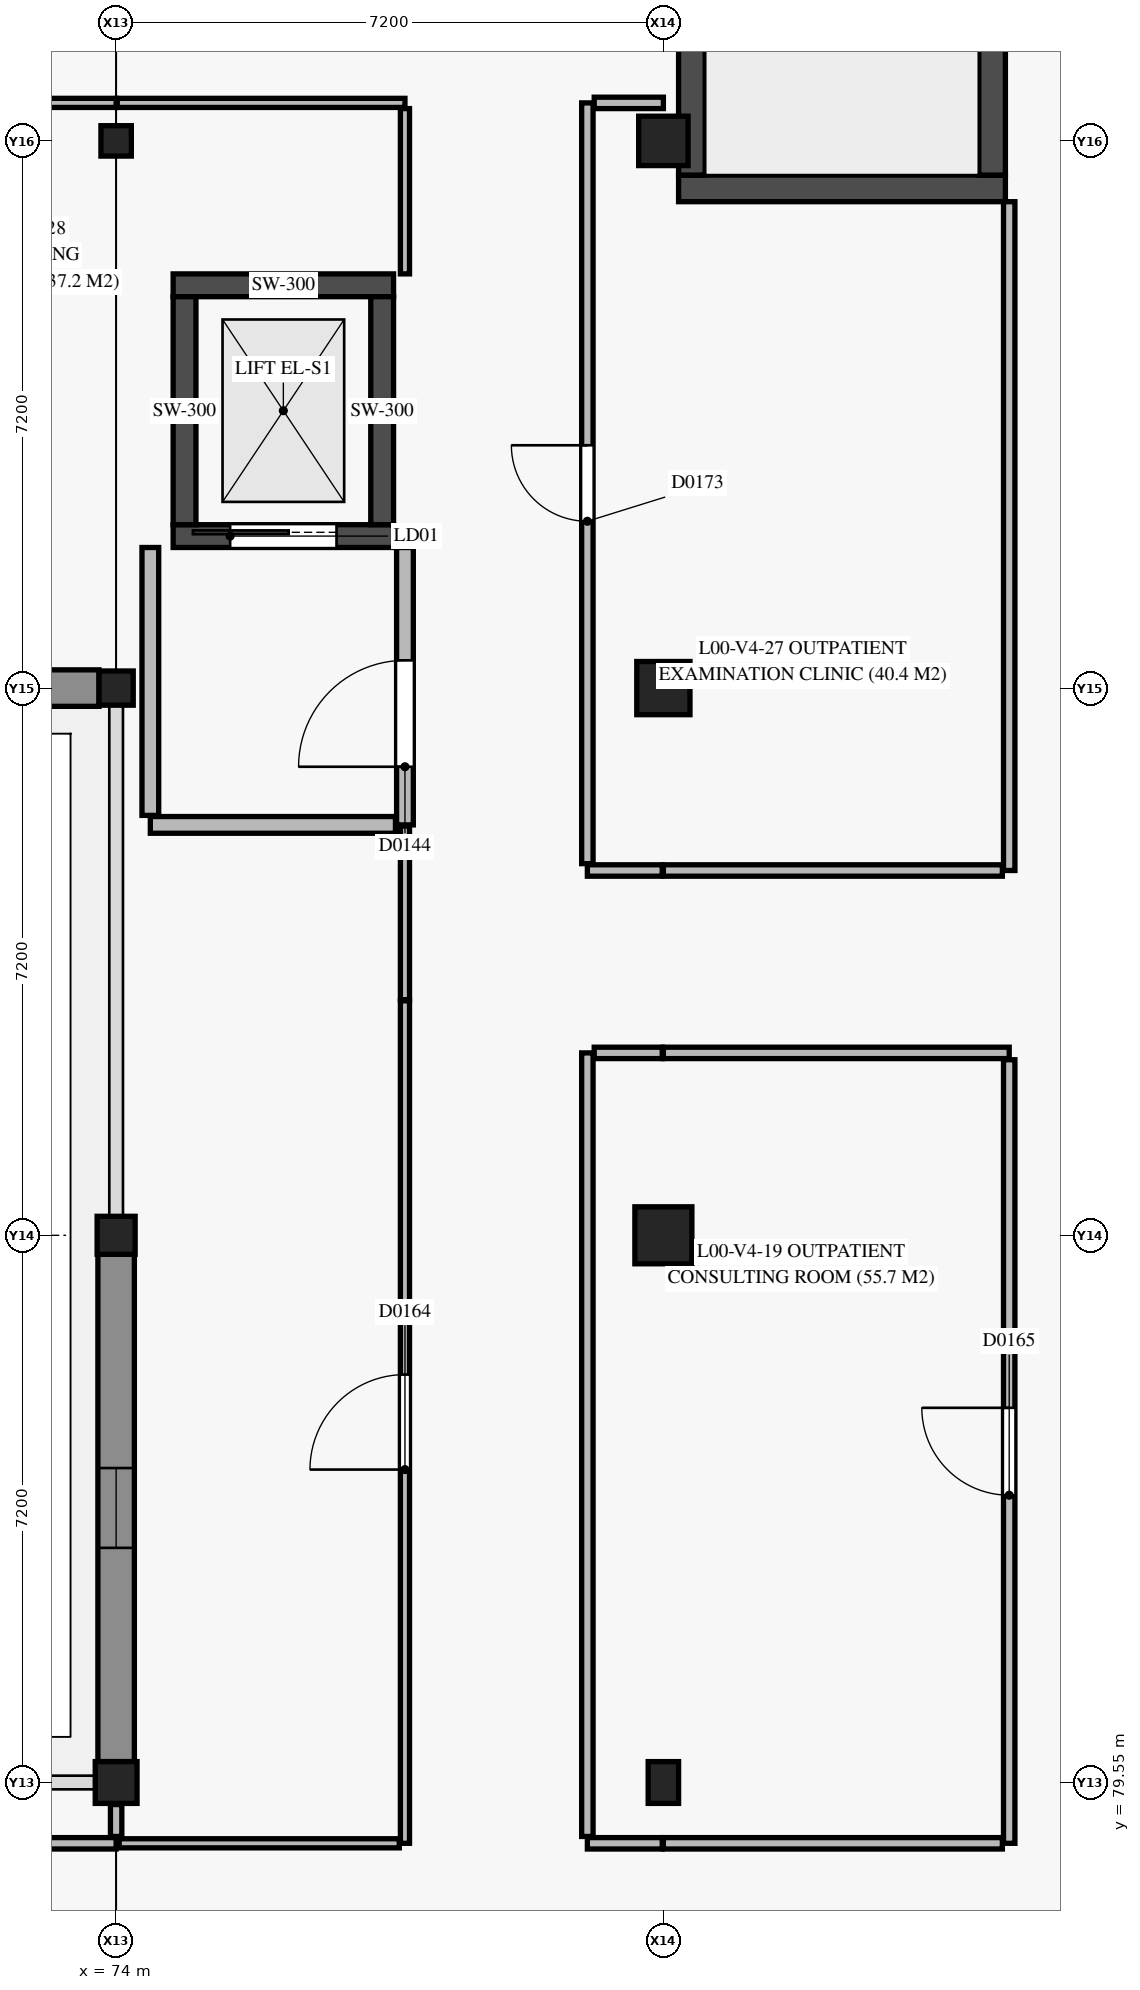
"""IFC4 building model, lengths in metres.
Left out: names, types, materials, properties, quantities, classifications, styles, units other than length and angle.
Written with IfcOpenShell. Run it as: python <this file> out.ifc"""

import sys

from ifc_helpers import new_model, si_unit, direction, frame, frame_2d, origin, origin_2d, place, context, subcontext, project, spatial, rectangle, extrude, element, fill, save


model = new_model("IFC4")
c1 = context("Model", 3, precision=1e-05, world=origin(), true_north=direction((0.0, 1.0)))
c2 = subcontext(c1, "Body", "Model", "MODEL_VIEW")
j1 = project(units=[si_unit("LENGTHUNIT", "METRE"), si_unit("PLANEANGLEUNIT", "RADIAN")], contexts=[c1])
p1 = place(None, origin())
s1 = spatial("IfcSite", under=j1, at=p1, CompositionType="ELEMENT")
p2 = place(p1, origin())
s2 = spatial("IfcBuilding", under=s1, at=p2, CompositionType="ELEMENT")
p3 = place(p2, origin())
s3 = spatial("IfcBuildingStorey", under=s2, at=p3, CompositionType="ELEMENT", Elevation=0.0)
p4 = place(p3, frame((74.0, 79.55, 0.0), z_axis=(0.0, 0.0, 1.0), x_axis=(1.0, 0.0, 0.0)))
e1 = element("IfcColumn", 1, at=p4, inside=s3, PredefinedType="COLUMN", context=c2, shape_type="SweptSolid", body=[
    extrude(rectangle(XDim=0.55, YDim=0.55, at=origin_2d()), origin(), (0.0, 0.0, 1.0), 4.8),
])
p5 = place(p3, frame((74.0, 86.75, 0.0), z_axis=(0.0, 0.0, 1.0), x_axis=(1.0, 0.0, 0.0)))
e2 = element("IfcColumn", 2, at=p5, inside=s3, PredefinedType="COLUMN", context=c2, shape_type="SweptSolid", body=[
    extrude(rectangle(XDim=0.5, YDim=0.5, at=origin_2d()), origin(), (0.0, 0.0, 1.0), 4.8),
])
p6 = place(p3, frame((74.0, 93.95, 0.0), z_axis=(0.0, 0.0, 1.0), x_axis=(1.0, 0.0, 0.0)))
e3 = element("IfcColumn", 3, at=p6, inside=s3, PredefinedType="COLUMN", context=c2, shape_type="SweptSolid", body=[
    extrude(rectangle(XDim=0.45, YDim=0.45, at=origin_2d()), origin(), (0.0, 0.0, 1.0), 4.8),
])
p7 = place(p3, frame((74.0, 101.15, 0.0), z_axis=(0.0, 0.0, 1.0), x_axis=(1.0, 0.0, 0.0)))
e4 = element("IfcColumn", 4, at=p7, inside=s3, PredefinedType="COLUMN", context=c2, shape_type="SweptSolid", body=[
    extrude(rectangle(XDim=0.4, YDim=0.4, at=origin_2d()), origin(), (0.0, 0.0, 1.0), 4.8),
])
p8 = place(p3, frame((81.2, 79.55, 0.0), z_axis=(0.0, 0.0, 1.0), x_axis=(1.0, 0.0, 0.0)))
e5 = element("IfcColumn", 5, at=p8, inside=s3, PredefinedType="COLUMN", context=c2, shape_type="SweptSolid", body=[
    extrude(rectangle(XDim=0.4, YDim=0.55, at=origin_2d()), origin(), (0.0, 0.0, 1.0), 4.8),
])
p9 = place(p3, frame((81.2, 86.75, 0.0), z_axis=(0.0, 0.0, 1.0), x_axis=(1.0, 0.0, 0.0)))
e6 = element("IfcColumn", 6, at=p9, inside=s3, PredefinedType="COLUMN", context=c2, shape_type="SweptSolid", body=[
    extrude(rectangle(XDim=0.75, YDim=0.75, at=origin_2d()), origin(), (0.0, 0.0, 1.0), 4.8),
])
p10 = place(p3, frame((81.2, 93.95, 0.0), z_axis=(0.0, 0.0, 1.0), x_axis=(1.0, 0.0, 0.0)))
e7 = element("IfcColumn", 7, at=p10, inside=s3, PredefinedType="COLUMN", context=c2, shape_type="SweptSolid", body=[
    extrude(rectangle(XDim=0.7, YDim=0.7, at=origin_2d()), origin(), (0.0, 0.0, 1.0), 4.8),
])
p11 = place(p3, frame((81.2, 101.15, 0.0), z_axis=(0.0, 0.0, 1.0), x_axis=(1.0, 0.0, 0.0)))
e8 = element("IfcColumn", 8, at=p11, inside=s3, PredefinedType="COLUMN", context=c2, shape_type="SweptSolid", body=[
    extrude(rectangle(XDim=0.65, YDim=0.65, at=origin_2d()), origin(), (0.0, 0.0, 1.0), 4.8),
])
p12 = place(p3, frame((81.4, 100.525, 0.0), z_axis=(0.0, 0.0, 1.0), x_axis=(1.0, 0.0, 0.0)))
e9 = element("IfcWall", 9, at=p12, inside=s3, PredefinedType="SHEAR", context=c2, shape_type="SweptSolid", body=[
    extrude(rectangle(XDim=4.3, YDim=0.35, at=frame_2d((2.15, 0.0))), origin(), (0.0, 0.0, 1.0), 4.55),
])
p13 = place(p3, frame((81.575, 100.7, 0.0), z_axis=(0.0, 0.0, 1.0), x_axis=(0.0, 1.0, 0.0)))
e10 = element("IfcWall", 10, at=p13, inside=s3, PredefinedType="SHEAR", context=c2, shape_type="SweptSolid", body=[
    extrude(rectangle(XDim=7.3, YDim=0.35, at=frame_2d((3.65, 0.0))), origin(), (0.0, 0.0, 1.0), 4.55),
])
p14 = place(p3, frame((85.525, 100.7, 0.0), z_axis=(0.0, 0.0, 1.0), x_axis=(0.0, 1.0, 0.0)))
e11 = element("IfcWall", 11, at=p14, inside=s3, PredefinedType="SHEAR", context=c2, shape_type="SweptSolid", body=[
    extrude(rectangle(XDim=7.3, YDim=0.35, at=frame_2d((3.65, 0.0))), origin(), (0.0, 0.0, 1.0), 4.55),
])
p15 = place(p14, frame((5.68, 0.0, 0.0)))
e12 = element("IfcOpeningElement", 12, at=p15, cuts=e11, PredefinedType="OPENING", context=c2, shape_type="SweptSolid", body=[
    extrude(rectangle(XDim=1.5, YDim=2.15, at=frame_2d((0.75, 1.075))), frame((0.0, 0.185, 0.0), z_axis=(0.0, -1.0, 0.0), x_axis=(1.0, 0.0, 0.0)), (0.0, 0.0, 1.0), 0.37),
])
p16 = place(p3, frame((74.75, 95.95, 0.0), z_axis=(0.0, 0.0, 1.0), x_axis=(1.0, 0.0, 0.0)))
e13 = element("IfcWall", 13, at=p16, inside=s3, PredefinedType="SHEAR", context=c2, shape_type="SweptSolid", body=[
    extrude(rectangle(XDim=2.9, YDim=0.3, at=frame_2d((1.45, 0.0))), origin(), (0.0, 0.0, 1.0), 4.55),
])
p17 = place(p16, frame((0.75, 0.0, 0.0)))
e14 = element("IfcOpeningElement", 14, at=p17, cuts=e13, PredefinedType="OPENING", context=c2, shape_type="SweptSolid", body=[
    extrude(rectangle(XDim=1.4, YDim=2.15, at=frame_2d((0.7, 1.075))), frame((0.0, 0.16, 0.0), z_axis=(0.0, -1.0, 0.0), x_axis=(1.0, 0.0, 0.0)), (0.0, 0.0, 1.0), 0.32),
])
p18 = place(p3, frame((74.75, 99.25, 0.0), z_axis=(0.0, 0.0, 1.0), x_axis=(1.0, 0.0, 0.0)))
e15 = element("IfcWall", 15, at=p18, inside=s3, PredefinedType="SHEAR", context=c2, shape_type="SweptSolid", body=[
    extrude(rectangle(XDim=2.9, YDim=0.3, at=frame_2d((1.45, 0.0))), origin(), (0.0, 0.0, 1.0), 4.55),
])
for number, where, z_axis, x_axis in (
    (16, (74.9, 96.1, 0.0), (0.0, 0.0, 1.0), (0.0, 1.0, 0.0)),
    (17, (77.5, 96.1, 0.0), (0.0, 0.0, 1.0), (0.0, 1.0, 0.0)),
):
    element("IfcWall", number, at=place(p3, frame(where, z_axis=z_axis, x_axis=x_axis)), inside=s3, PredefinedType="SHEAR", context=c2, shape_type="SweptSolid", body=[
        extrude(rectangle(XDim=3.0, YDim=0.3, at=frame_2d((1.5, 0.0))), origin(), (0.0, 0.0, 1.0), 4.55),
    ])
p19 = place(p3, frame((74.0, 79.825, 0.0), z_axis=(0.0, 0.0, 1.0), x_axis=(0.0, 1.0, 0.0)))
e18 = element("IfcWall", 18, at=p19, inside=s3, PredefinedType="SOLIDWALL", context=c2, shape_type="SweptSolid", body=[
    extrude(rectangle(XDim=6.675, YDim=0.48, at=frame_2d((3.337, 0.0))), origin(), (0.0, 0.0, 1.0), 3.73),
])
p20 = place(p19, frame((2.812, 0.0, 0.9)))
e19 = element("IfcOpeningElement", 19, at=p20, cuts=e18, PredefinedType="OPENING", context=c2, shape_type="SweptSolid", body=[
    extrude(rectangle(XDim=1.05, YDim=1.8, at=frame_2d((0.525, 0.9))), frame((0.0, 0.25, 0.0), z_axis=(0.0, -1.0, 0.0), x_axis=(1.0, 0.0, 0.0)), (0.0, 0.0, 1.0), 0.5),
])
p21 = place(p3, frame((73.775, 93.95, 0.0), z_axis=(0.0, 0.0, 1.0), x_axis=(-1.0, 0.0, 0.0)))
e20 = element("IfcWall", 20, at=p21, inside=s3, PredefinedType="SOLIDWALL", context=c2, shape_type="SweptSolid", body=[
    extrude(rectangle(XDim=6.775, YDim=0.48, at=frame_2d((3.387, 0.0))), origin(), (0.0, 0.0, 1.0), 3.73),
])
p22 = place(p21, frame((4.118, 0.0, 0.0)))
e21 = element("IfcOpeningElement", 21, at=p22, cuts=e20, PredefinedType="OPENING", context=c2, shape_type="SweptSolid", body=[
    extrude(rectangle(XDim=1.6, YDim=2.3, at=frame_2d((0.8, 1.15))), frame((0.0, 0.25, 0.0), z_axis=(0.0, -1.0, 0.0), x_axis=(1.0, 0.0, 0.0)), (0.0, 0.0, 1.0), 0.5),
])
p23 = place(p3, frame((77.8, 92.15, 0.0), z_axis=(0.0, 0.0, 1.0), x_axis=(0.0, 1.0, 0.0)))
e22 = element("IfcWall", 22, at=p23, inside=s3, PredefinedType="PARTITIONING", context=c2, shape_type="SweptSolid", body=[
    extrude(rectangle(XDim=3.65, YDim=0.22, at=frame_2d((1.825, 0.0))), origin(), (0.0, 0.0, 1.0), 3.885),
])
p24 = place(p23, frame((0.765, 0.0, 0.0)))
e23 = element("IfcOpeningElement", 23, at=p24, cuts=e22, PredefinedType="OPENING", context=c2, shape_type="SweptSolid", body=[
    extrude(rectangle(XDim=1.4, YDim=2.2, at=frame_2d((0.7, 1.1))), frame((0.0, 0.12, 0.0), z_axis=(0.0, -1.0, 0.0), x_axis=(1.0, 0.0, 0.0)), (0.0, 0.0, 1.0), 0.24),
])
p25 = place(p3, frame((74.45, 92.15, 0.0), z_axis=(0.0, 0.0, 1.0), x_axis=(1.0, 0.0, 0.0)))
e24 = element("IfcWall", 24, at=p25, inside=s3, PredefinedType="PARTITIONING", context=c2, shape_type="SweptSolid", body=[
    extrude(rectangle(XDim=3.225, YDim=0.22, at=frame_2d((1.613, 0.0))), origin(), (0.0, 0.0, 1.0), 4.55),
])
p26 = place(p3, frame((74.45, 92.275, 0.0), z_axis=(0.0, 0.0, 1.0), x_axis=(0.0, 1.0, 0.0)))
e25 = element("IfcWall", 25, at=p26, inside=s3, PredefinedType="PARTITIONING", context=c2, shape_type="SweptSolid", body=[
    extrude(rectangle(XDim=3.525, YDim=0.22, at=frame_2d((1.763, 0.0))), origin(), (0.0, 0.0, 1.0), 3.885),
])
p27 = place(p3, frame((73.0, 78.75, 0.0), z_axis=(0.0, 0.0, 1.0), x_axis=(1.0, 0.0, 0.0)))
e26 = element("IfcWall", 26, at=p27, inside=s3, PredefinedType="PARTITIONING", context=c2, shape_type="SweptSolid", body=[
    extrude(rectangle(XDim=1.0, YDim=0.15, at=frame_2d((0.5, 0.0))), origin(), (0.0, 0.0, 1.0), 4.055),
])
p28 = place(p3, frame((81.2, 89.15, 0.0), z_axis=(0.0, 0.0, 1.0), x_axis=(1.0, 0.0, 0.0)))
e27 = element("IfcWall", 27, at=p28, inside=s3, PredefinedType="PARTITIONING", context=c2, shape_type="SweptSolid", body=[
    extrude(rectangle(XDim=4.55, YDim=0.15, at=frame_2d((2.275, 0.0))), origin(), (0.0, 0.0, 1.0), 4.055),
])
p29 = place(p3, frame((85.75, 78.75, 0.0), z_axis=(0.0, 0.0, 1.0), x_axis=(0.0, 1.0, 0.0)))
e28 = element("IfcWall", 28, at=p29, inside=s3, PredefinedType="PARTITIONING", context=c2, shape_type="SweptSolid", body=[
    extrude(rectangle(XDim=10.31, YDim=0.15, at=frame_2d((5.155, 0.0))), origin(), (0.0, 0.0, 1.0), 3.815),
])
p30 = place(p29, frame((4.58, 0.0, 0.0)))
e29 = element("IfcOpeningElement", 29, at=p30, cuts=e28, PredefinedType="OPENING", context=c2, shape_type="SweptSolid", body=[
    extrude(rectangle(XDim=1.15, YDim=2.15, at=frame_2d((0.575, 1.075))), frame((0.0, 0.085, 0.0), z_axis=(0.0, -1.0, 0.0), x_axis=(1.0, 0.0, 0.0)), (0.0, 0.0, 1.0), 0.17),
])
p31 = place(p3, frame((81.2, 78.75, 0.0), z_axis=(0.0, 0.0, 1.0), x_axis=(1.0, 0.0, 0.0)))
e30 = element("IfcWall", 30, at=p31, inside=s3, PredefinedType="PARTITIONING", context=c2, shape_type="SweptSolid", body=[
    extrude(rectangle(XDim=4.46, YDim=0.15, at=frame_2d((2.23, 0.0))), origin(), (0.0, 0.0, 1.0), 3.885),
])
p32 = place(p3, frame((80.2, 78.75, 0.0), z_axis=(0.0, 0.0, 1.0), x_axis=(1.0, 0.0, 0.0)))
e31 = element("IfcWall", 31, at=p32, inside=s3, PredefinedType="PARTITIONING", context=c2, shape_type="SweptSolid", body=[
    extrude(rectangle(XDim=0.985, YDim=0.15, at=frame_2d((0.493, 0.0))), origin(), (0.0, 0.0, 1.0), 3.885),
])
p33 = place(p3, frame((80.2, 78.84, 0.0), z_axis=(0.0, 0.0, 1.0), x_axis=(0.0, 1.0, 0.0)))
e32 = element("IfcWall", 32, at=p33, inside=s3, PredefinedType="PARTITIONING", context=c2, shape_type="SweptSolid", body=[
    extrude(rectangle(XDim=10.31, YDim=0.15, at=frame_2d((5.155, 0.0))), origin(), (0.0, 0.0, 1.0), 3.955),
])
p34 = place(p3, frame((80.29, 89.15, 0.0), z_axis=(0.0, 0.0, 1.0), x_axis=(1.0, 0.0, 0.0)))
e33 = element("IfcWall", 33, at=p34, inside=s3, PredefinedType="PARTITIONING", context=c2, shape_type="SweptSolid", body=[
    extrude(rectangle(XDim=0.895, YDim=0.15, at=frame_2d((0.448, 0.0))), origin(), (0.0, 0.0, 1.0), 4.055),
])
p35 = place(p3, frame((85.75, 91.55, 0.0), z_axis=(0.0, 0.0, 1.0), x_axis=(0.0, 1.0, 0.0)))
e34 = element("IfcWall", 34, at=p35, inside=s3, PredefinedType="PARTITIONING", context=c2, shape_type="SweptSolid", body=[
    extrude(rectangle(XDim=8.8, YDim=0.15, at=frame_2d((4.4, 0.0))), origin(), (0.0, 0.0, 1.0), 3.885),
])
p36 = place(p3, frame((81.2, 91.55, 0.0), z_axis=(0.0, 0.0, 1.0), x_axis=(1.0, 0.0, 0.0)))
e35 = element("IfcWall", 35, at=p36, inside=s3, PredefinedType="PARTITIONING", context=c2, shape_type="SweptSolid", body=[
    extrude(rectangle(XDim=4.46, YDim=0.15, at=frame_2d((2.23, 0.0))), origin(), (0.0, 0.0, 1.0), 4.055),
])
p37 = place(p3, frame((80.2, 91.55, 0.0), z_axis=(0.0, 0.0, 1.0), x_axis=(1.0, 0.0, 0.0)))
e36 = element("IfcWall", 36, at=p37, inside=s3, PredefinedType="PARTITIONING", context=c2, shape_type="SweptSolid", body=[
    extrude(rectangle(XDim=0.985, YDim=0.15, at=frame_2d((0.493, 0.0))), origin(), (0.0, 0.0, 1.0), 4.055),
])
p38 = place(p3, frame((80.2, 91.64, 0.0), z_axis=(0.0, 0.0, 1.0), x_axis=(0.0, 1.0, 0.0)))
e37 = element("IfcWall", 37, at=p38, inside=s3, PredefinedType="PARTITIONING", context=c2, shape_type="SweptSolid", body=[
    extrude(rectangle(XDim=10.01, YDim=0.15, at=frame_2d((5.005, 0.0))), origin(), (0.0, 0.0, 1.0), 3.815),
])
p39 = place(p38, frame((4.505, 0.0, 0.0)))
e38 = element("IfcOpeningElement", 38, at=p39, cuts=e37, PredefinedType="OPENING", context=c2, shape_type="SweptSolid", body=[
    extrude(rectangle(XDim=1.0, YDim=2.15, at=frame_2d((0.5, 1.075))), frame((0.0, 0.085, 0.0), z_axis=(0.0, -1.0, 0.0), x_axis=(1.0, 0.0, 0.0)), (0.0, 0.0, 1.0), 0.17),
])
p40 = place(p3, frame((80.29, 101.65, 0.0), z_axis=(0.0, 0.0, 1.0), x_axis=(1.0, 0.0, 0.0)))
e39 = element("IfcWall", 39, at=p40, inside=s3, PredefinedType="PARTITIONING", context=c2, shape_type="SweptSolid", body=[
    extrude(rectangle(XDim=0.91, YDim=0.15, at=frame_2d((0.455, 0.0))), origin(), (0.0, 0.0, 1.0), 3.885),
])
p41 = place(p3, frame((77.8, 89.85, 0.0), z_axis=(0.0, 0.0, 1.0), x_axis=(0.0, 1.0, 0.0)))
e40 = element("IfcWall", 40, at=p41, inside=s3, PredefinedType="PARTITIONING", context=c2, shape_type="SweptSolid", body=[
    extrude(rectangle(XDim=2.285, YDim=0.12, at=frame_2d((1.143, 0.0))), origin(), (0.0, 0.0, 1.0), 4.115),
])
p42 = place(p3, frame((77.8, 78.75, 0.0), z_axis=(0.0, 0.0, 1.0), x_axis=(0.0, 1.0, 0.0)))
e41 = element("IfcWall", 41, at=p42, inside=s3, PredefinedType="PARTITIONING", context=c2, shape_type="SweptSolid", body=[
    extrude(rectangle(XDim=11.085, YDim=0.12, at=frame_2d((5.542, 0.0))), origin(), (0.0, 0.0, 1.0), 3.955),
])
p43 = place(p42, frame((4.917, 0.0, 0.0)))
e42 = element("IfcOpeningElement", 42, at=p43, cuts=e41, PredefinedType="OPENING", context=c2, shape_type="SweptSolid", body=[
    extrude(rectangle(XDim=1.25, YDim=2.15, at=frame_2d((0.625, 1.075))), frame((0.0, 0.07, 0.0), z_axis=(0.0, -1.0, 0.0), x_axis=(1.0, 0.0, 0.0)), (0.0, 0.0, 1.0), 0.14),
])
p44 = place(p3, frame((74.04, 78.75, 0.0), z_axis=(0.0, 0.0, 1.0), x_axis=(1.0, 0.0, 0.0)))
e43 = element("IfcWall", 43, at=p44, inside=s3, PredefinedType="PARTITIONING", context=c2, shape_type="SweptSolid", body=[
    extrude(rectangle(XDim=3.685, YDim=0.12, at=frame_2d((1.843, 0.0))), origin(), (0.0, 0.0, 1.0), 4.055),
])
p45 = place(p3, frame((70.505, 101.65, 0.0), z_axis=(0.0, 0.0, 1.0), x_axis=(1.0, 0.0, 0.0)))
e44 = element("IfcWall", 44, at=p45, inside=s3, PredefinedType="PARTITIONING", context=c2, shape_type="SweptSolid", body=[
    extrude(rectangle(XDim=3.495, YDim=0.12, at=frame_2d((1.748, 0.0))), origin(), (0.0, 0.0, 1.0), 4.015),
])
p46 = place(p3, frame((74.015, 101.65, 0.0), z_axis=(0.0, 0.0, 1.0), x_axis=(1.0, 0.0, 0.0)))
e45 = element("IfcWall", 45, at=p46, inside=s3, PredefinedType="PARTITIONING", context=c2, shape_type="SweptSolid", body=[
    extrude(rectangle(XDim=3.785, YDim=0.12, at=frame_2d((1.893, 0.0))), origin(), (0.0, 0.0, 1.0), 4.015),
])
p47 = place(p3, frame((77.8, 99.4, 0.0), z_axis=(0.0, 0.0, 1.0), x_axis=(0.0, 1.0, 0.0)))
e46 = element("IfcWall", 46, at=p47, inside=s3, PredefinedType="PARTITIONING", context=c2, shape_type="SweptSolid", body=[
    extrude(rectangle(XDim=2.175, YDim=0.12, at=frame_2d((1.087, 0.0))), origin(), (0.0, 0.0, 1.0), 3.815),
])
p48 = place(p3, frame((74.0, 78.84, 0.0), z_axis=(0.0, 0.0, 1.0), x_axis=(0.0, 1.0, 0.0)))
e47 = element("IfcWall", 47, at=p48, inside=s3, PredefinedType="PARTITIONING", context=c2, shape_type="SweptSolid", body=[
    extrude(rectangle(XDim=0.42, YDim=0.15, at=frame_2d((0.21, 0.0))), origin(), (0.0, 0.0, 1.0), 4.055),
])
p49 = place(p20, origin())
e48 = element("IfcWindow", 48, at=p49, inside=s3, PartitioningType="SINGLE_PANEL", PredefinedType="WINDOW", context=c2, shape_type="SweptSolid", body=[
    extrude(rectangle(XDim=1.05, YDim=1.8, at=frame_2d((0.525, 0.9))), frame((0.0, 0.03, 0.0), z_axis=(0.0, -1.0, 0.0), x_axis=(1.0, 0.0, 0.0)), (0.0, 0.0, 1.0), 0.06),
])
fill(e19, e48)
p50 = place(p17, origin())
e49 = element("IfcDoor", 49, at=p50, inside=s3, OperationType="SLIDING_TO_LEFT", PredefinedType="DOOR", context=c2, shape_type="SweptSolid", body=[
    extrude(rectangle(XDim=1.4, YDim=2.15, at=frame_2d((0.7, 1.075))), frame((0.0, 0.025, 0.0), z_axis=(0.0, -1.0, 0.0), x_axis=(1.0, 0.0, 0.0)), (0.0, 0.0, 1.0), 0.05),
])
fill(e14, e49)
p51 = place(p24, origin())
e50 = element("IfcDoor", 50, at=p51, inside=s3, OperationType="SINGLE_SWING_LEFT", PredefinedType="DOOR", context=c2, shape_type="SweptSolid", body=[
    extrude(rectangle(XDim=1.4, YDim=2.2, at=frame_2d((0.7, 1.1))), frame((0.0, 0.025, 0.0), z_axis=(0.0, -1.0, 0.0), x_axis=(1.0, 0.0, 0.0)), (0.0, 0.0, 1.0), 0.05),
])
fill(e23, e50)
p52 = place(p43, origin())
e51 = element("IfcDoor", 51, at=p52, inside=s3, OperationType="SINGLE_SWING_LEFT", PredefinedType="DOOR", context=c2, shape_type="SweptSolid", body=[
    extrude(rectangle(XDim=1.25, YDim=2.15, at=frame_2d((0.625, 1.075))), frame((0.0, 0.025, 0.0), z_axis=(0.0, -1.0, 0.0), x_axis=(1.0, 0.0, 0.0)), (0.0, 0.0, 1.0), 0.05),
])
fill(e42, e51)
p53 = place(p30, origin())
e52 = element("IfcDoor", 52, at=p53, inside=s3, OperationType="SINGLE_SWING_RIGHT", PredefinedType="DOOR", context=c2, shape_type="SweptSolid", body=[
    extrude(rectangle(XDim=1.15, YDim=2.15, at=frame_2d((0.575, 1.075))), frame((0.0, 0.025, 0.0), z_axis=(0.0, -1.0, 0.0), x_axis=(1.0, 0.0, 0.0)), (0.0, 0.0, 1.0), 0.05),
])
fill(e29, e52)
p54 = place(p39, origin())
e53 = element("IfcDoor", 53, at=p54, inside=s3, OperationType="SINGLE_SWING_RIGHT", PredefinedType="DOOR", context=c2, shape_type="SweptSolid", body=[
    extrude(rectangle(XDim=1.0, YDim=2.15, at=frame_2d((0.5, 1.075))), frame((0.0, 0.025, 0.0), z_axis=(0.0, -1.0, 0.0), x_axis=(1.0, 0.0, 0.0)), (0.0, 0.0, 1.0), 0.05),
])
fill(e38, e53)
save(model, sys.argv[1])
